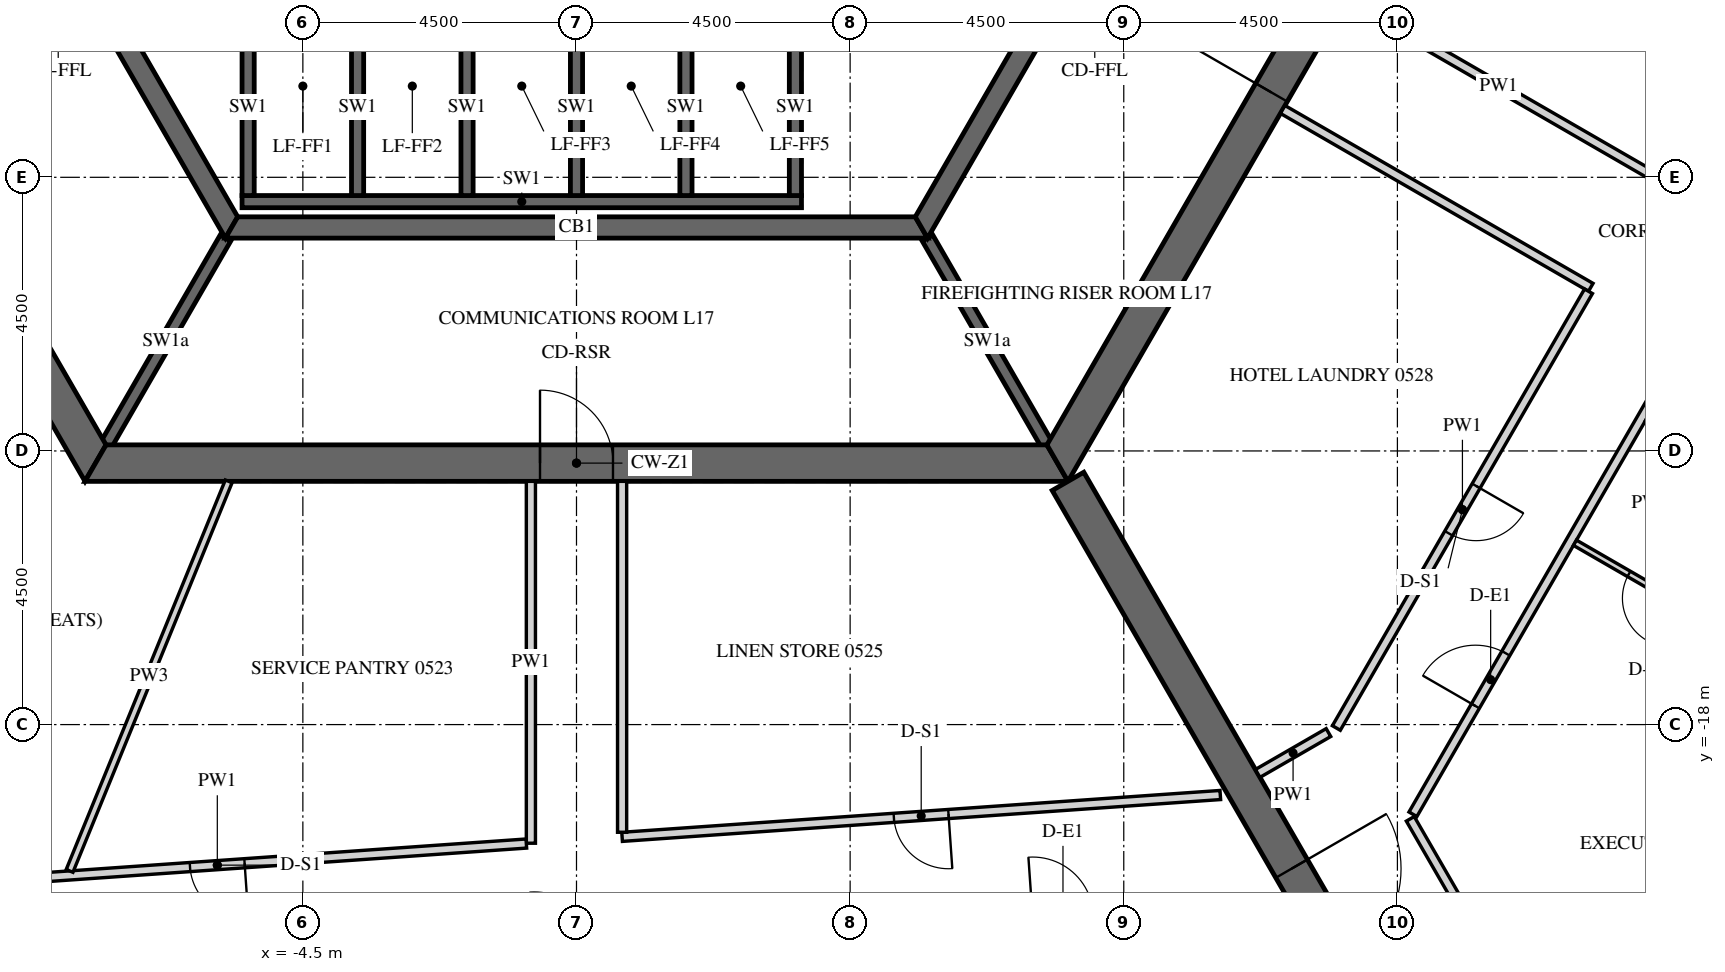
"""IFC4 building model, lengths in metres.
Left out: names, types, materials, properties, quantities, classifications, styles, units other than length and angle.
Written with IfcOpenShell. Run it as: python <this file> out.ifc"""

import sys

from ifc_helpers import new_model, si_unit, direction, frame, frame_2d, origin, place, context, subcontext, project, spatial, polyline, rectangle, outline, extrude, element, fill, save


model = new_model("IFC4")
c1 = context("Model", 3, precision=1e-05, world=origin(), true_north=direction((0.0, 1.0)))
c2 = subcontext(c1, "Body", "Model", "MODEL_VIEW")
j1 = project(units=[si_unit("LENGTHUNIT", "METRE"), si_unit("PLANEANGLEUNIT", "RADIAN")], contexts=[c1])
p1 = place(None, origin())
s1 = spatial("IfcSite", under=j1, at=p1, CompositionType="ELEMENT")
p2 = place(p1, origin())
s2 = spatial("IfcBuilding", under=s1, at=p2, CompositionType="ELEMENT")
p3 = place(p2, frame((0.0, 0.0, 80.4)))
s3 = spatial("IfcBuildingStorey", under=s2, at=p3, CompositionType="ELEMENT", Elevation=80.4)
p4 = place(p3, frame((-15.819, 0.0, -0.15), z_axis=(0.0, 0.0, 1.0), x_axis=(0.499999880136, -0.866025472988, 0.0)))
e1 = element("IfcWall", 1, at=p4, inside=s3, PredefinedType="SHEAR", context=c2, shape_type="SweptSolid", body=[
    extrude(outline(polyline([(-0.173, -0.3), (15.993, -0.3), (15.646, 0.3), (0.173, 0.3), (-0.173, -0.3)])), origin(), (0.0, 0.0, 1.0), 3.9),
])
p5 = place(p4, frame((6.981, 0.0, 0.15)))
e2 = element("IfcOpeningElement", 2, at=p5, cuts=e1, PredefinedType="OPENING", context=c2, shape_type="SweptSolid", body=[
    extrude(rectangle(XDim=1.8, YDim=2.4, at=frame_2d((0.9, 1.2))), frame((0.0, 0.31, 0.0), z_axis=(0.0, -1.0, 0.0), x_axis=(1.0, 0.0, 0.0)), (0.0, 0.0, 1.0), 0.62),
])
p6 = place(p3, frame((-7.91, -13.7, -0.15), z_axis=(0.0, 0.0, 1.0), x_axis=(1.0, 0.0, 0.0)))
e3 = element("IfcWall", 3, at=p6, inside=s3, PredefinedType="SHEAR", context=c2, shape_type="SweptSolid", body=[
    extrude(outline(polyline([(-0.173, -0.3), (15.993, -0.3), (15.646, 0.3), (0.173, 0.3), (-0.173, -0.3)])), origin(), (0.0, 0.0, 1.0), 3.9),
])
p7 = place(p6, frame((7.31, 0.0, 0.15)))
e4 = element("IfcOpeningElement", 4, at=p7, cuts=e3, PredefinedType="OPENING", context=c2, shape_type="SweptSolid", body=[
    extrude(rectangle(XDim=1.2, YDim=2.4, at=frame_2d((0.6, 1.2))), frame((0.0, 0.31, 0.0), z_axis=(0.0, -1.0, 0.0), x_axis=(1.0, 0.0, 0.0)), (0.0, 0.0, 1.0), 0.62),
])
p8 = place(p3, frame((7.91, -13.7, -0.15), z_axis=(0.0, 0.0, 1.0), x_axis=(0.499999880136, 0.866025472988, 0.0)))
e5 = element("IfcWall", 5, at=p8, inside=s3, PredefinedType="SHEAR", context=c2, shape_type="SweptSolid", body=[
    extrude(outline(polyline([(-0.173, -0.3), (15.993, -0.3), (15.646, 0.3), (0.173, 0.3), (-0.173, -0.3)])), origin(), (0.0, 0.0, 1.0), 3.9),
])
p9 = place(p8, frame((7.039, 0.0, 0.15)))
e6 = element("IfcOpeningElement", 6, at=p9, cuts=e5, PredefinedType="OPENING", context=c2, shape_type="SweptSolid", body=[
    extrude(rectangle(XDim=1.8, YDim=2.4, at=frame_2d((0.9, 1.2))), frame((0.0, 0.31, 0.0), z_axis=(0.0, -1.0, 0.0), x_axis=(1.0, 0.0, 0.0)), (0.0, 0.0, 1.0), 0.62),
])
p10 = place(p3, frame((8.083, -14.0, -0.15), z_axis=(0.0, 0.0, 1.0), x_axis=(0.499997680643, -0.866026742862, 0.0)))
e7 = element("IfcWall", 7, at=p10, inside=s3, PredefinedType="SHEAR", context=c2, shape_type="SweptSolid", body=[
    extrude(rectangle(XDim=16.509, YDim=0.6, at=frame_2d((8.254, 0.0))), origin(), (0.0, 0.0, 1.0), 3.9),
])
p11 = place(p10, frame((7.354, 0.0, 0.15)))
e8 = element("IfcOpeningElement", 8, at=p11, cuts=e7, PredefinedType="OPENING", context=c2, shape_type="SweptSolid", body=[
    extrude(rectangle(XDim=1.8, YDim=2.4, at=frame_2d((0.9, 1.2))), frame((0.0, 0.31, 0.0), z_axis=(0.0, -1.0, 0.0), x_axis=(1.0, 0.0, 0.0)), (0.0, 0.0, 1.0), 0.62),
])
p12 = place(p3, frame((-11.345, 0.0, -0.15), z_axis=(0.0, 0.0, 1.0), x_axis=(0.499995046907, -0.866028263435, 0.0)))
e9 = element("IfcWall", 9, at=p12, inside=s3, PredefinedType="SHEAR", context=c2, shape_type="SweptSolid", body=[
    extrude(outline(polyline([(-0.101, -0.175), (11.446, -0.175), (11.244, 0.175), (0.101, 0.175), (-0.101, -0.175)])), origin(), (0.0, 0.0, 1.0), 3.9),
])
p13 = place(p12, frame((4.744, 0.0, 0.15)))
e10 = element("IfcOpeningElement", 10, at=p13, cuts=e9, PredefinedType="OPENING", context=c2, shape_type="SweptSolid", body=[
    extrude(rectangle(XDim=1.8, YDim=2.4, at=frame_2d((0.9, 1.2))), frame((0.0, 0.185, 0.0), z_axis=(0.0, -1.0, 0.0), x_axis=(1.0, 0.0, 0.0)), (0.0, 0.0, 1.0), 0.37),
])
p14 = place(p3, frame((-5.673, -9.825, -0.15), z_axis=(0.0, 0.0, 1.0), x_axis=(1.0, 0.0, 0.0)))
e11 = element("IfcWall", 11, at=p14, inside=s3, PredefinedType="SHEAR", context=c2, shape_type="SweptSolid", body=[
    extrude(outline(polyline([(-0.101, -0.175), (11.446, -0.175), (11.244, 0.175), (0.101, 0.175), (-0.101, -0.175)])), origin(), (0.0, 0.0, 1.0), 3.9),
])
p15 = place(p3, frame((5.673, -9.825, -0.15), z_axis=(0.0, 0.0, 1.0), x_axis=(0.499995046907, 0.866028263435, 0.0)))
e12 = element("IfcWall", 12, at=p15, inside=s3, PredefinedType="SHEAR", context=c2, shape_type="SweptSolid", body=[
    extrude(outline(polyline([(-0.101, -0.175), (11.446, -0.175), (11.244, 0.175), (0.101, 0.175), (-0.101, -0.175)])), origin(), (0.0, 0.0, 1.0), 3.9),
])
p16 = place(p15, frame((4.801, 0.0, 0.15)))
e13 = element("IfcOpeningElement", 13, at=p16, cuts=e12, PredefinedType="OPENING", context=c2, shape_type="SweptSolid", body=[
    extrude(rectangle(XDim=1.8, YDim=2.4, at=frame_2d((0.9, 1.2))), frame((0.0, 0.185, 0.0), z_axis=(0.0, -1.0, 0.0), x_axis=(1.0, 0.0, 0.0)), (0.0, 0.0, 1.0), 0.37),
])
p17 = place(p3, frame((-5.5, -9.4, -0.25), z_axis=(0.0, 0.0, 1.0), x_axis=(1.0, 0.0, 0.0)))
e14 = element("IfcWall", 14, at=p17, inside=s3, PredefinedType="SHEAR", context=c2, shape_type="SweptSolid", body=[
    extrude(rectangle(XDim=9.2, YDim=0.2, at=frame_2d((4.6, 0.0))), origin(), (0.0, 0.0, 1.0), 3.9),
])
for number, where, z_axis, x_axis in (
    (15, (-5.4, -9.3, -0.25), (0.0, 0.0, 1.0), (0.0, 1.0, 0.0)),
    (16, (-3.6, -9.3, -0.25), (0.0, 0.0, 1.0), (0.0, 1.0, 0.0)),
    (17, (-1.8, -9.3, -0.25), (0.0, 0.0, 1.0), (0.0, 1.0, 0.0)),
    (18, (0.0, -9.3, -0.25), (0.0, 0.0, 1.0), (0.0, 1.0, 0.0)),
    (19, (1.8, -9.3, -0.25), (0.0, 0.0, 1.0), (0.0, 1.0, 0.0)),
    (20, (3.6, -9.3, -0.25), (0.0, 0.0, 1.0), (0.0, 1.0, 0.0)),
):
    element("IfcWall", number, at=place(p3, frame(where, z_axis=z_axis, x_axis=x_axis)), inside=s3, PredefinedType="SHEAR", context=c2, shape_type="SweptSolid", body=[
        extrude(rectangle(XDim=2.9, YDim=0.2, at=frame_2d((1.45, 0.0))), origin(), (0.0, 0.0, 1.0), 3.9),
    ])
for number, where, z_axis, x_axis in (
    (21, (-5.773, -10.0, -0.15), (0.0, 0.0, 1.0), (-0.5, -0.866, 0.0)),
    (22, (5.773, -10.0, -0.15), (0.0, 0.0, 1.0), (0.5, -0.866, 0.0)),
):
    element("IfcWall", number, at=place(p3, frame(where, z_axis=z_axis, x_axis=x_axis)), inside=s3, PredefinedType="SHEAR", context=c2, shape_type="SweptSolid", body=[
        extrude(rectangle(XDim=3.926, YDim=0.2, at=frame_2d((1.963, 0.0))), origin(), (0.0, 0.0, 1.0), 3.9),
    ])
p18 = place(p3, frame((-0.75, -14.0, 0.0), z_axis=(0.0, 0.0, 1.0), x_axis=(0.0, -1.0, 0.0)))
e23 = element("IfcWall", 23, at=p18, inside=s3, PredefinedType="PARTITIONING", context=c2, shape_type="SweptSolid", body=[
    extrude(rectangle(XDim=5.951, YDim=0.15, at=frame_2d((2.976, 0.0))), origin(), (0.0, 0.0, 1.0), 2.988),
])
p19 = place(p3, frame((-0.825, -19.956, 0.0), z_axis=(0.0, 0.0, 1.0), x_axis=(-0.997562587881, -0.069777383582, 0.0)))
e24 = element("IfcWall", 24, at=p19, inside=s3, PredefinedType="PARTITIONING", context=c2, shape_type="SweptSolid", body=[
    extrude(rectangle(XDim=10.189, YDim=0.15, at=frame_2d((5.094, 0.0))), origin(), (0.0, 0.0, 1.0), 2.988),
])
p20 = place(p19, frame((4.644, 0.0, 0.0)))
e25 = element("IfcOpeningElement", 25, at=p20, cuts=e24, PredefinedType="OPENING", context=c2, shape_type="SweptSolid", body=[
    extrude(rectangle(XDim=0.9, YDim=2.1, at=frame_2d((0.45, 1.05))), frame((0.0, 0.085, 0.0), z_axis=(0.0, -1.0, 0.0), x_axis=(1.0, 0.0, 0.0)), (0.0, 0.0, 1.0), 0.17),
])
p21 = place(p3, frame((10.587, -19.158, 0.0), z_axis=(0.0, 0.0, 1.0), x_axis=(-0.997565137136, -0.069740928955, 0.0)))
e26 = element("IfcWall", 26, at=p21, inside=s3, PredefinedType="PARTITIONING", context=c2, shape_type="SweptSolid", body=[
    extrude(rectangle(XDim=9.861, YDim=0.15, at=frame_2d((4.931, 0.0))), origin(), (0.0, 0.0, 1.0), 2.988),
])
p22 = place(p21, frame((4.481, 0.0, 0.0)))
e27 = element("IfcOpeningElement", 27, at=p22, cuts=e26, PredefinedType="OPENING", context=c2, shape_type="SweptSolid", body=[
    extrude(rectangle(XDim=0.9, YDim=2.1, at=frame_2d((0.45, 1.05))), frame((0.0, 0.085, 0.0), z_axis=(0.0, -1.0, 0.0), x_axis=(1.0, 0.0, 0.0)), (0.0, 0.0, 1.0), 0.17),
])
p23 = place(p3, frame((0.75, -19.771, 0.0), z_axis=(0.0, 0.0, 1.0), x_axis=(0.0, 1.0, 0.0)))
e28 = element("IfcWall", 28, at=p23, inside=s3, PredefinedType="PARTITIONING", context=c2, shape_type="SweptSolid", body=[
    extrude(rectangle(XDim=5.771, YDim=0.15, at=frame_2d((2.885, 0.0))), origin(), (0.0, 0.0, 1.0), 2.988),
])
p24 = place(p3, frame((15.441, -22.545, 0.0), z_axis=(0.0, 0.0, 1.0), x_axis=(-0.500003541824, 0.866023358902, 0.0)))
e29 = element("IfcWall", 29, at=p24, inside=s3, PredefinedType="PARTITIONING", context=c2, shape_type="SweptSolid", body=[
    extrude(rectangle(XDim=3.458, YDim=0.15, at=frame_2d((1.729, 0.0))), origin(), (0.0, 0.0, 1.0), 2.988),
])
p25 = place(p3, frame((13.755, -19.475, 0.0), z_axis=(0.0, 0.0, 1.0), x_axis=(0.50000013933, 0.866025323342, 0.0)))
e30 = element("IfcWall", 30, at=p25, inside=s3, PredefinedType="PARTITIONING", context=c2, shape_type="SweptSolid", body=[
    extrude(rectangle(XDim=23.517, YDim=0.15, at=frame_2d((11.758, 0.0))), origin(), (0.0, 0.0, 1.0), 2.988),
])
p26 = place(p25, frame((2.056, 0.0, 0.0)))
e31 = element("IfcOpeningElement", 31, at=p26, cuts=e30, PredefinedType="OPENING", context=c2, shape_type="SweptSolid", body=[
    extrude(rectangle(XDim=1.0, YDim=2.1, at=frame_2d((0.5, 1.05))), frame((0.0, 0.085, 0.0), z_axis=(0.0, -1.0, 0.0), x_axis=(1.0, 0.0, 0.0)), (0.0, 0.0, 1.0), 0.17),
])
p27 = place(p25, frame((15.499, 0.0, 0.0)))
e32 = element("IfcOpeningElement", 32, at=p27, cuts=e30, PredefinedType="OPENING", context=c2, shape_type="SweptSolid", body=[
    extrude(rectangle(XDim=1.0, YDim=2.1, at=frame_2d((0.5, 1.05))), frame((0.0, 0.085, 0.0), z_axis=(0.0, -1.0, 0.0), x_axis=(1.0, 0.0, 0.0)), (0.0, 0.0, 1.0), 0.17),
])
p28 = place(p3, frame((17.665, -8.953, 0.0), z_axis=(0.0, 0.0, 1.0), x_axis=(-0.866025774745, 0.499999357477, 0.0)))
e33 = element("IfcWall", 33, at=p28, inside=s3, PredefinedType="PARTITIONING", context=c2, shape_type="SweptSolid", body=[
    extrude(rectangle(XDim=5.775, YDim=0.15, at=frame_2d((2.887, 0.0))), origin(), (0.0, 0.0, 1.0), 2.988),
])
p29 = place(p3, frame((11.614, -7.884, 0.0), z_axis=(0.0, 0.0, 1.0), x_axis=(0.866018092707, -0.500012662943, 0.0)))
e34 = element("IfcWall", 34, at=p29, inside=s3, PredefinedType="PARTITIONING", context=c2, shape_type="SweptSolid", body=[
    extrude(rectangle(XDim=5.85, YDim=0.15, at=frame_2d((2.925, 0.0))), origin(), (0.0, 0.0, 1.0), 2.988),
])
p30 = place(p3, frame((16.643, -10.874, 0.0), z_axis=(0.0, 0.0, 1.0), x_axis=(-0.50000192383, -0.866024293058, 0.0)))
e35 = element("IfcWall", 35, at=p30, inside=s3, PredefinedType="PARTITIONING", context=c2, shape_type="SweptSolid", body=[
    extrude(rectangle(XDim=8.293, YDim=0.15, at=frame_2d((4.146, 0.0))), origin(), (0.0, 0.0, 1.0), 2.988),
])
p31 = place(p30, frame((3.697, 0.0, 0.0)))
e36 = element("IfcOpeningElement", 36, at=p31, cuts=e35, PredefinedType="OPENING", context=c2, shape_type="SweptSolid", body=[
    extrude(rectangle(XDim=0.9, YDim=2.1, at=frame_2d((0.45, 1.05))), frame((0.0, 0.085, 0.0), z_axis=(0.0, -1.0, 0.0), x_axis=(1.0, 0.0, 0.0)), (0.0, 0.0, 1.0), 0.17),
])
p32 = place(p3, frame((12.366, -18.131, 0.0), z_axis=(0.0, 0.0, 1.0), x_axis=(-0.866043397086, -0.499968833392, 0.0)))
e37 = element("IfcWall", 37, at=p32, inside=s3, PredefinedType="PARTITIONING", context=c2, shape_type="SweptSolid", body=[
    extrude(rectangle(XDim=1.344, YDim=0.15, at=frame_2d((0.672, 0.0))), origin(), (0.0, 0.0, 1.0), 2.988),
])
p33 = place(p3, frame((18.91, -16.447, 0.0), z_axis=(0.0, 0.0, 1.0), x_axis=(-0.866018712932, 0.500011588718, 0.0)))
e38 = element("IfcWall", 38, at=p33, inside=s3, PredefinedType="PARTITIONING", context=c2, shape_type="SweptSolid", body=[
    extrude(rectangle(XDim=2.875, YDim=0.1, at=frame_2d((1.438, 0.0))), origin(), (0.0, 0.0, 1.0), 2.988),
])
p34 = place(p33, frame((1.05, 0.0, 0.0)))
e39 = element("IfcOpeningElement", 39, at=p34, cuts=e38, PredefinedType="OPENING", context=c2, shape_type="SweptSolid", body=[
    extrude(rectangle(XDim=0.8, YDim=2.1, at=frame_2d((0.4, 1.05))), frame((0.0, 0.06, 0.0), z_axis=(0.0, -1.0, 0.0), x_axis=(1.0, 0.0, 0.0)), (0.0, 0.0, 1.0), 0.12),
])
p35 = place(p3, frame((24.31, -16.794, 0.0), z_axis=(0.0, 0.0, 1.0), x_axis=(-0.866027174938, 0.499996932259, 0.0)))
e40 = element("IfcWall", 40, at=p35, inside=s3, PredefinedType="PARTITIONING", context=c2, shape_type="SweptSolid", body=[
    extrude(rectangle(XDim=7.725, YDim=0.18, at=frame_2d((3.863, 0.0))), origin(), (0.0, 0.0, 1.0), 2.988),
])
p36 = place(p3, frame((-5.719, -14.0, 0.0), z_axis=(0.0, 0.0, 1.0), x_axis=(-0.378193217714, -0.925726682166, 0.0)))
e41 = element("IfcWall", 41, at=p36, inside=s3, PredefinedType="PARTITIONING", context=c2, shape_type="SweptSolid", body=[
    extrude(rectangle(XDim=6.92, YDim=0.12, at=frame_2d((3.46, 0.0))), origin(), (0.0, 0.0, 1.0), 2.988),
])
p37 = place(p9, origin())
e42 = element("IfcDoor", 42, at=p37, inside=s3, OperationType="DOUBLE_DOOR_SINGLE_SWING", PredefinedType="DOOR", context=c2, shape_type="SweptSolid", body=[
    extrude(rectangle(XDim=1.8, YDim=2.4, at=frame_2d((0.9, 1.2))), frame((0.0, 0.025, 0.0), z_axis=(0.0, -1.0, 0.0), x_axis=(1.0, 0.0, 0.0)), (0.0, 0.0, 1.0), 0.05),
])
fill(e6, e42)
p38 = place(p7, origin())
e43 = element("IfcDoor", 43, at=p38, inside=s3, OperationType="SINGLE_SWING_LEFT", PredefinedType="DOOR", context=c2, shape_type="SweptSolid", body=[
    extrude(rectangle(XDim=1.2, YDim=2.4, at=frame_2d((0.6, 1.2))), frame((0.0, 0.025, 0.0), z_axis=(0.0, -1.0, 0.0), x_axis=(1.0, 0.0, 0.0)), (0.0, 0.0, 1.0), 0.05),
])
fill(e4, e43)
p39 = place(p11, origin())
e44 = element("IfcDoor", 44, at=p39, inside=s3, OperationType="DOUBLE_DOOR_SINGLE_SWING", PredefinedType="DOOR", context=c2, shape_type="SweptSolid", body=[
    extrude(rectangle(XDim=1.8, YDim=2.4, at=frame_2d((0.9, 1.2))), frame((0.0, 0.025, 0.0), z_axis=(0.0, -1.0, 0.0), x_axis=(1.0, 0.0, 0.0)), (0.0, 0.0, 1.0), 0.05),
])
fill(e8, e44)
p40 = place(p26, origin())
e45 = element("IfcDoor", 45, at=p40, inside=s3, OperationType="SINGLE_SWING_RIGHT", PredefinedType="DOOR", context=c2, shape_type="SweptSolid", body=[
    extrude(rectangle(XDim=1.0, YDim=2.1, at=frame_2d((0.5, 1.05))), frame((0.0, 0.025, 0.0), z_axis=(0.0, -1.0, 0.0), x_axis=(1.0, 0.0, 0.0)), (0.0, 0.0, 1.0), 0.05),
])
fill(e31, e45)
p41 = place(p34, origin())
e46 = element("IfcDoor", 46, at=p41, inside=s3, OperationType="SINGLE_SWING_LEFT", PredefinedType="DOOR", context=c2, shape_type="SweptSolid", body=[
    extrude(rectangle(XDim=0.8, YDim=2.1, at=frame_2d((0.4, 1.05))), frame((0.0, 0.025, 0.0), z_axis=(0.0, -1.0, 0.0), x_axis=(1.0, 0.0, 0.0)), (0.0, 0.0, 1.0), 0.05),
])
fill(e39, e46)
p42 = place(p20, origin())
e47 = element("IfcDoor", 47, at=p42, inside=s3, OperationType="SINGLE_SWING_LEFT", PredefinedType="DOOR", context=c2, shape_type="SweptSolid", body=[
    extrude(rectangle(XDim=0.9, YDim=2.1, at=frame_2d((0.45, 1.05))), frame((0.0, 0.025, 0.0), z_axis=(0.0, -1.0, 0.0), x_axis=(1.0, 0.0, 0.0)), (0.0, 0.0, 1.0), 0.05),
])
fill(e25, e47)
p43 = place(p22, origin())
e48 = element("IfcDoor", 48, at=p43, inside=s3, OperationType="SINGLE_SWING_RIGHT", PredefinedType="DOOR", context=c2, shape_type="SweptSolid", body=[
    extrude(rectangle(XDim=0.9, YDim=2.1, at=frame_2d((0.45, 1.05))), frame((0.0, 0.025, 0.0), z_axis=(0.0, -1.0, 0.0), x_axis=(1.0, 0.0, 0.0)), (0.0, 0.0, 1.0), 0.05),
])
fill(e27, e48)
p44 = place(p31, origin())
e49 = element("IfcDoor", 49, at=p44, inside=s3, OperationType="SINGLE_SWING_RIGHT", PredefinedType="DOOR", context=c2, shape_type="SweptSolid", body=[
    extrude(rectangle(XDim=0.9, YDim=2.1, at=frame_2d((0.45, 1.05))), frame((0.0, 0.025, 0.0), z_axis=(0.0, -1.0, 0.0), x_axis=(1.0, 0.0, 0.0)), (0.0, 0.0, 1.0), 0.05),
])
fill(e36, e49)
save(model, sys.argv[1])
